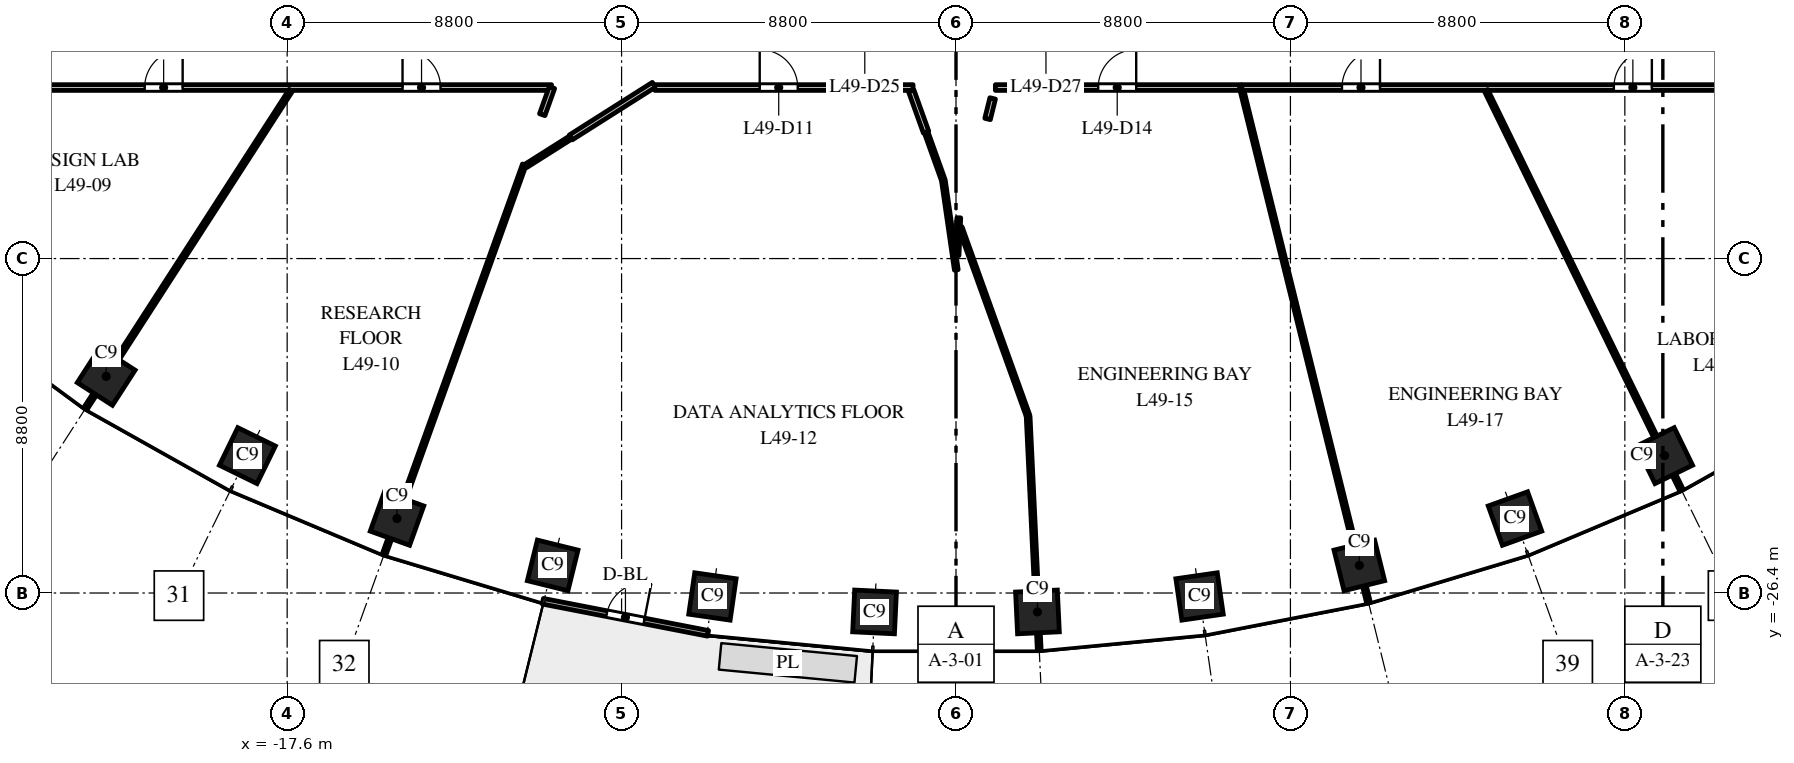
"""IFC4 building model, lengths in metres.
Left out: names, types, materials, properties, quantities, classifications, styles, units other than length and angle.
Written with IfcOpenShell. Run it as: python <this file> out.ifc"""

import sys

from ifc_helpers import new_model, si_unit, direction, frame, frame_2d, origin, origin_2d, place, context, subcontext, project, spatial, rectangle, extrude, element, fill, save


model = new_model("IFC4")
c1 = context("Model", 3, precision=1e-05, world=origin(), true_north=direction((0.0, 1.0)))
c2 = subcontext(c1, "Body", "Model", "MODEL_VIEW")
j1 = project(units=[si_unit("LENGTHUNIT", "METRE"), si_unit("PLANEANGLEUNIT", "RADIAN")], contexts=[c1])
p1 = place(None, origin())
s1 = spatial("IfcSite", under=j1, at=p1, CompositionType="ELEMENT")
p2 = place(p1, origin())
s2 = spatial("IfcBuilding", under=s1, at=p2, CompositionType="ELEMENT")
p3 = place(p2, frame((0.0, 0.0, 237.5)))
s3 = spatial("IfcBuildingStorey", under=s2, at=p3, CompositionType="ELEMENT", Elevation=237.5)
for number, where, z_axis, x_axis in (
    (1, (-22.362, -20.7, 0.0), (0.0, 0.0, 1.0), (0.84, -0.542, 0.0)),
    (2, (-18.646, -22.785, 0.0), (0.0, 0.0, 1.0), (0.898, -0.439, 0.0)),
    (3, (-14.709, -24.441, 0.0), (0.0, 0.0, 1.0), (0.941, -0.338, 0.0)),
    (4, (-10.613, -25.674, 0.0), (0.0, 0.0, 1.0), (0.971, -0.24, 0.0)),
    (5, (-6.409, -26.491, 0.0), (0.0, 0.0, 1.0), (0.99, -0.143, 0.0)),
    (6, (-2.143, -26.898, 0.0), (0.0, 0.0, 1.0), (0.999, -0.048, 0.0)),
    (7, (2.143, -26.898, 0.0), (0.0, 0.0, 1.0), (0.999, 0.048, 0.0)),
    (8, (6.409, -26.491, 0.0), (0.0, 0.0, 1.0), (0.99, 0.143, 0.0)),
    (9, (10.613, -25.674, 0.0), (0.0, 0.0, 1.0), (0.971, 0.24, 0.0)),
    (10, (14.709, -24.441, 0.0), (0.0, 0.0, 1.0), (0.941, 0.338, 0.0)),
    (11, (18.646, -22.785, 0.0), (0.0, 0.0, 1.0), (0.898, 0.439, 0.0)),
):
    element("IfcColumn", number, at=place(p3, frame(where, z_axis=z_axis, x_axis=x_axis)), inside=s3, PredefinedType="COLUMN", context=c2, shape_type="SweptSolid", body=[
        extrude(rectangle(XDim=1.1, YDim=1.1, at=origin_2d()), origin(), (0.0, 0.0, 1.0), 4.0),
    ])
p4 = place(p3, frame((-10.871, -26.617, 0.0), z_axis=(0.0, 0.0, 1.0), x_axis=(0.981631174778, -0.190788460615, 0.0)))
e12 = element("IfcWall", 12, at=p4, inside=s3, PredefinedType="STANDARD", context=c2, shape_type="SweptSolid", body=[
    extrude(rectangle(XDim=4.426, YDim=0.15, at=frame_2d((2.213, 0.0))), origin(), (0.0, 0.0, 1.0), 3.7),
])
p5 = place(p4, frame((1.713, 0.0, 0.0)))
e13 = element("IfcOpeningElement", 13, at=p5, cuts=e12, PredefinedType="OPENING", context=c2, shape_type="SweptSolid", body=[
    extrude(rectangle(XDim=1.0, YDim=2.4, at=frame_2d((0.5, 1.2))), frame((0.0, 0.085, 0.0), z_axis=(0.0, -1.0, 0.0), x_axis=(1.0, 0.0, 0.0)), (0.0, 0.0, 1.0), 0.17),
])
p6 = place(p3, frame((-24.0, -13.1, 0.0), z_axis=(0.0, 0.0, 1.0), x_axis=(1.0, 0.0, 0.0)))
e14 = element("IfcWall", 14, at=p6, inside=s3, PredefinedType="PARTITIONING", context=c2, shape_type="SweptSolid", body=[
    extrude(rectangle(XDim=13.357, YDim=0.15, at=frame_2d((6.678, 0.0))), origin(), (0.0, 0.0, 1.0), 2.75),
])
p7 = place(p6, frame((2.65, 0.0, 0.0)))
e15 = element("IfcOpeningElement", 15, at=p7, cuts=e14, PredefinedType="OPENING", context=c2, shape_type="SweptSolid", body=[
    extrude(rectangle(XDim=1.0, YDim=2.1, at=frame_2d((0.5, 1.05))), frame((0.0, 0.085, 0.0), z_axis=(0.0, -1.0, 0.0), x_axis=(1.0, 0.0, 0.0)), (0.0, 0.0, 1.0), 0.17),
])
p8 = place(p6, frame((9.436, 0.0, 0.0)))
e16 = element("IfcOpeningElement", 16, at=p8, cuts=e14, PredefinedType="OPENING", context=c2, shape_type="SweptSolid", body=[
    extrude(rectangle(XDim=1.0, YDim=2.1, at=frame_2d((0.5, 1.05))), frame((0.0, 0.085, 0.0), z_axis=(0.0, -1.0, 0.0), x_axis=(1.0, 0.0, 0.0)), (0.0, 0.0, 1.0), 0.17),
])
p9 = place(p3, frame((-22.905, -21.542, 0.0), z_axis=(0.0, 0.0, 1.0), x_axis=(0.542277075573, 0.840199722273, 0.0)))
e17 = element("IfcWall", 17, at=p9, inside=s3, PredefinedType="PARTITIONING", context=c2, shape_type="SweptSolid", body=[
    extrude(rectangle(XDim=9.958, YDim=0.1, at=frame_2d((4.979, 0.0))), origin(), (0.0, 0.0, 1.0), 3.0),
])
p10 = place(p3, frame((-15.048, -25.383, 0.0), z_axis=(0.0, 0.0, 1.0), x_axis=(0.338406105684, 0.941000163462, 0.0)))
e18 = element("IfcWall", 18, at=p10, inside=s3, PredefinedType="PARTITIONING", context=c2, shape_type="SweptSolid", body=[
    extrude(rectangle(XDim=10.898, YDim=0.1, at=frame_2d((5.449, 0.0))), origin(), (0.0, 0.0, 1.0), 3.0),
])
p11 = place(p3, frame((-11.319, -15.161, 0.0), z_axis=(0.0, 0.0, 1.0), x_axis=(0.845102975348, 0.534603555037, 0.0)))
e19 = element("IfcWall", 19, at=p11, inside=s3, PredefinedType="PARTITIONING", context=c2, shape_type="SweptSolid", body=[
    extrude(rectangle(XDim=1.399, YDim=0.1, at=frame_2d((0.699, 0.0))), origin(), (0.0, 0.0, 1.0), 3.7),
])
p12 = place(p3, frame((-10.888, -13.814, 0.0), z_axis=(0.0, 0.0, 1.0), x_axis=(0.337396703232, 0.941362557492, 0.0)))
e20 = element("IfcWall", 20, at=p12, inside=s3, PredefinedType="PARTITIONING", context=c2, shape_type="SweptSolid", body=[
    extrude(rectangle(XDim=0.758, YDim=0.15, at=frame_2d((0.379, 0.0))), origin(), (0.0, 0.0, 1.0), 2.85),
])
p13 = place(p3, frame((-10.137, -14.413, 0.0), z_axis=(0.0, 0.0, 1.0), x_axis=(0.844665601723, 0.535294331434, 0.0)))
e21 = element("IfcWall", 21, at=p13, inside=s3, PredefinedType="PARTITIONING", context=c2, shape_type="SweptSolid", body=[
    extrude(rectangle(XDim=2.589, YDim=0.15, at=frame_2d((1.294, 0.0))), origin(), (0.0, 0.0, 1.0), 3.7),
])
p14 = place(p3, frame((-7.925, -13.1, 0.0), z_axis=(0.0, 0.0, 1.0), x_axis=(1.0, 0.0, 0.0)))
e22 = element("IfcWall", 22, at=p14, inside=s3, PredefinedType="PARTITIONING", context=c2, shape_type="SweptSolid", body=[
    extrude(rectangle(XDim=6.795, YDim=0.15, at=frame_2d((3.397, 0.0))), origin(), (0.0, 0.0, 1.0), 2.85),
])
p15 = place(p14, frame((2.76, 0.0, 0.0)))
e23 = element("IfcOpeningElement", 23, at=p15, cuts=e22, PredefinedType="OPENING", context=c2, shape_type="SweptSolid", body=[
    extrude(rectangle(XDim=1.0, YDim=2.1, at=frame_2d((0.5, 1.05))), frame((0.0, 0.085, 0.0), z_axis=(0.0, -1.0, 0.0), x_axis=(1.0, 0.0, 0.0)), (0.0, 0.0, 1.0), 0.17),
])
p16 = place(p3, frame((-1.181, -13.179, 0.0), z_axis=(0.0, 0.0, 1.0), x_axis=(0.337945854866, -0.941165553545, 0.0)))
e24 = element("IfcWall", 24, at=p16, inside=s3, PredefinedType="PARTITIONING", context=c2, shape_type="SweptSolid", body=[
    extrude(rectangle(XDim=1.162, YDim=0.15, at=frame_2d((0.581, 0.0))), origin(), (0.0, 0.0, 1.0), 2.85),
])
p17 = place(p3, frame((-0.784, -14.283, 0.0), z_axis=(0.0, 0.0, 1.0), x_axis=(0.337476813817, -0.94133384096, 0.0)))
e25 = element("IfcWall", 25, at=p17, inside=s3, PredefinedType="PARTITIONING", context=c2, shape_type="SweptSolid", body=[
    extrude(rectangle(XDim=1.315, YDim=0.1, at=frame_2d((0.658, 0.0))), origin(), (0.0, 0.0, 1.0), 3.7),
])
p18 = place(p3, frame((-0.333, -15.539, 0.0), z_axis=(0.0, 0.0, 1.0), x_axis=(0.143041001304, -0.989716763496, 0.0)))
e26 = element("IfcWall", 26, at=p18, inside=s3, PredefinedType="PARTITIONING", context=c2, shape_type="SweptSolid", body=[
    extrude(rectangle(XDim=2.384, YDim=0.1, at=frame_2d((1.192, 0.0))), origin(), (0.0, 0.0, 1.0), 3.7),
])
p19 = place(p3, frame((0.028, -17.519, 0.0), z_axis=(0.0, 0.0, 1.0), x_axis=(0.046221773591, 0.998931202659, 0.0)))
e27 = element("IfcWall", 27, at=p19, inside=s3, PredefinedType="PARTITIONING", context=c2, shape_type="SweptSolid", body=[
    extrude(rectangle(XDim=0.993, YDim=0.1, at=frame_2d((0.497, 0.0))), origin(), (0.0, 0.0, 1.0), 3.7),
])
p20 = place(p3, frame((0.113, -16.781, 0.0), z_axis=(0.0, 0.0, 1.0), x_axis=(0.338409154086, -0.940999067178, 0.0)))
e28 = element("IfcWall", 28, at=p20, inside=s3, PredefinedType="PARTITIONING", context=c2, shape_type="SweptSolid", body=[
    extrude(rectangle(XDim=5.266, YDim=0.1, at=frame_2d((2.633, 0.0))), origin(), (0.0, 0.0, 1.0), 3.7),
])
p21 = place(p3, frame((0.831, -13.927, 0.0), z_axis=(0.0, 0.0, 1.0), x_axis=(0.240473799965, 0.970655629732, 0.0)))
e29 = element("IfcWall", 29, at=p21, inside=s3, PredefinedType="PARTITIONING", context=c2, shape_type="SweptSolid", body=[
    extrude(rectangle(XDim=0.557, YDim=0.15, at=frame_2d((0.279, 0.0))), origin(), (0.0, 0.0, 1.0), 3.7),
])
p22 = place(p3, frame((1.036, -13.1, 0.0), z_axis=(0.0, 0.0, 1.0), x_axis=(1.0, 0.0, 0.0)))
e30 = element("IfcWall", 30, at=p22, inside=s3, PredefinedType="PARTITIONING", context=c2, shape_type="SweptSolid", body=[
    extrude(rectangle(XDim=6.471, YDim=0.15, at=frame_2d((3.236, 0.0))), origin(), (0.0, 0.0, 1.0), 2.85),
])
p23 = place(p22, frame((2.706, 0.0, 0.0)))
e31 = element("IfcOpeningElement", 31, at=p23, cuts=e30, PredefinedType="OPENING", context=c2, shape_type="SweptSolid", body=[
    extrude(rectangle(XDim=1.0, YDim=2.1, at=frame_2d((0.5, 1.05))), frame((0.0, 0.085, 0.0), z_axis=(0.0, -1.0, 0.0), x_axis=(1.0, 0.0, 0.0)), (0.0, 0.0, 1.0), 0.17),
])
p24 = place(p3, frame((1.898, -21.75, 0.0), z_axis=(0.0, 0.0, 1.0), x_axis=(0.047440765919, -0.998874052986, 0.0)))
e32 = element("IfcWall", 32, at=p24, inside=s3, PredefinedType="PARTITIONING", context=c2, shape_type="SweptSolid", body=[
    extrude(rectangle(XDim=6.155, YDim=0.1, at=frame_2d((3.077, 0.0))), origin(), (0.0, 0.0, 1.0), 3.0),
])
p25 = place(p3, frame((7.507, -13.1, 0.0), z_axis=(0.0, 0.0, 1.0), x_axis=(0.239800961037, -0.970822073856, 0.0)))
e33 = element("IfcWall", 33, at=p25, inside=s3, PredefinedType="PARTITIONING", context=c2, shape_type="SweptSolid", body=[
    extrude(rectangle(XDim=13.953, YDim=0.1, at=frame_2d((6.977, 0.0))), origin(), (0.0, 0.0, 1.0), 3.0),
])
p26 = place(p3, frame((7.524, -13.1, 0.0), z_axis=(0.0, 0.0, 1.0), x_axis=(1.0, 0.0, 0.0)))
e34 = element("IfcWall", 34, at=p26, inside=s3, PredefinedType="PARTITIONING", context=c2, shape_type="SweptSolid", body=[
    extrude(rectangle(XDim=16.476, YDim=0.15, at=frame_2d((8.238, 0.0))), origin(), (0.0, 0.0, 1.0), 2.85),
])
p27 = place(p26, frame((2.633, 0.0, 0.0)))
e35 = element("IfcOpeningElement", 35, at=p27, cuts=e34, PredefinedType="OPENING", context=c2, shape_type="SweptSolid", body=[
    extrude(rectangle(XDim=1.0, YDim=2.1, at=frame_2d((0.5, 1.05))), frame((0.0, 0.085, 0.0), z_axis=(0.0, -1.0, 0.0), x_axis=(1.0, 0.0, 0.0)), (0.0, 0.0, 1.0), 0.17),
])
p28 = place(p26, frame((9.787, 0.0, 0.0)))
e36 = element("IfcOpeningElement", 36, at=p28, cuts=e34, PredefinedType="OPENING", context=c2, shape_type="SweptSolid", body=[
    extrude(rectangle(XDim=1.0, YDim=2.1, at=frame_2d((0.5, 1.05))), frame((0.0, 0.085, 0.0), z_axis=(0.0, -1.0, 0.0), x_axis=(1.0, 0.0, 0.0)), (0.0, 0.0, 1.0), 0.17),
])
p29 = place(p3, frame((13.948, -13.175, 0.0), z_axis=(0.0, 0.0, 1.0), x_axis=(0.439190294188, -0.898394059136, 0.0)))
e37 = element("IfcWall", 37, at=p29, inside=s3, PredefinedType="PARTITIONING", context=c2, shape_type="SweptSolid", body=[
    extrude(rectangle(XDim=11.699, YDim=0.1, at=frame_2d((5.849, 0.0))), origin(), (0.0, 0.0, 1.0), 3.0),
])
p30 = place(p5, origin())
e38 = element("IfcDoor", 38, at=p30, inside=s3, OperationType="SINGLE_SWING_RIGHT", PredefinedType="DOOR", context=c2, shape_type="SweptSolid", body=[
    extrude(rectangle(XDim=1.0, YDim=2.4, at=frame_2d((0.5, 1.2))), frame((0.0, 0.025, 0.0), z_axis=(0.0, -1.0, 0.0), x_axis=(1.0, 0.0, 0.0)), (0.0, 0.0, 1.0), 0.05),
])
fill(e13, e38)
p31 = place(p7, origin())
e39 = element("IfcDoor", 39, at=p31, inside=s3, OperationType="SINGLE_SWING_RIGHT", PredefinedType="DOOR", context=c2, shape_type="SweptSolid", body=[
    extrude(rectangle(XDim=1.0, YDim=2.1, at=frame_2d((0.5, 1.05))), frame((0.0, 0.025, 0.0), z_axis=(0.0, -1.0, 0.0), x_axis=(1.0, 0.0, 0.0)), (0.0, 0.0, 1.0), 0.05),
])
fill(e15, e39)
p32 = place(p8, origin())
e40 = element("IfcDoor", 40, at=p32, inside=s3, OperationType="SINGLE_SWING_LEFT", PredefinedType="DOOR", context=c2, shape_type="SweptSolid", body=[
    extrude(rectangle(XDim=1.0, YDim=2.1, at=frame_2d((0.5, 1.05))), frame((0.0, 0.025, 0.0), z_axis=(0.0, -1.0, 0.0), x_axis=(1.0, 0.0, 0.0)), (0.0, 0.0, 1.0), 0.05),
])
fill(e16, e40)
p33 = place(p15, origin())
e41 = element("IfcDoor", 41, at=p33, inside=s3, OperationType="SINGLE_SWING_LEFT", PredefinedType="DOOR", context=c2, shape_type="SweptSolid", body=[
    extrude(rectangle(XDim=1.0, YDim=2.1, at=frame_2d((0.5, 1.05))), frame((0.0, 0.025, 0.0), z_axis=(0.0, -1.0, 0.0), x_axis=(1.0, 0.0, 0.0)), (0.0, 0.0, 1.0), 0.05),
])
fill(e23, e41)
p34 = place(p23, origin())
e42 = element("IfcDoor", 42, at=p34, inside=s3, OperationType="SINGLE_SWING_RIGHT", PredefinedType="DOOR", context=c2, shape_type="SweptSolid", body=[
    extrude(rectangle(XDim=1.0, YDim=2.1, at=frame_2d((0.5, 1.05))), frame((0.0, 0.025, 0.0), z_axis=(0.0, -1.0, 0.0), x_axis=(1.0, 0.0, 0.0)), (0.0, 0.0, 1.0), 0.05),
])
fill(e31, e42)
p35 = place(p27, origin())
e43 = element("IfcDoor", 43, at=p35, inside=s3, OperationType="SINGLE_SWING_RIGHT", PredefinedType="DOOR", context=c2, shape_type="SweptSolid", body=[
    extrude(rectangle(XDim=1.0, YDim=2.1, at=frame_2d((0.5, 1.05))), frame((0.0, 0.025, 0.0), z_axis=(0.0, -1.0, 0.0), x_axis=(1.0, 0.0, 0.0)), (0.0, 0.0, 1.0), 0.05),
])
fill(e35, e43)
p36 = place(p28, origin())
e44 = element("IfcDoor", 44, at=p36, inside=s3, OperationType="SINGLE_SWING_RIGHT", PredefinedType="DOOR", context=c2, shape_type="SweptSolid", body=[
    extrude(rectangle(XDim=1.0, YDim=2.1, at=frame_2d((0.5, 1.05))), frame((0.0, 0.025, 0.0), z_axis=(0.0, -1.0, 0.0), x_axis=(1.0, 0.0, 0.0)), (0.0, 0.0, 1.0), 0.05),
])
fill(e36, e44)
save(model, sys.argv[1])
